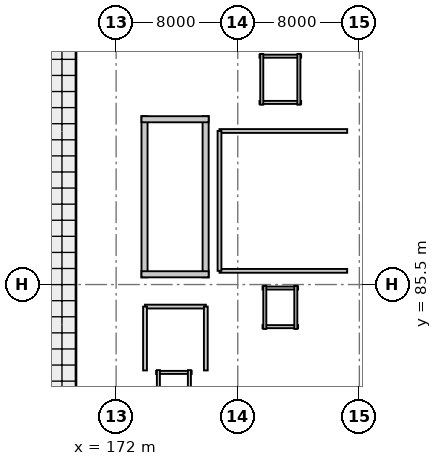
"""IFC4 building model, lengths in metres.
Left out: names, types, materials, properties, quantities, classifications, styles, units other than length and angle.
Written with IfcOpenShell. Run it as: python <this file> out.ifc"""

import sys

from ifc_helpers import new_model, si_unit, direction, frame, frame_2d, origin, origin_2d, place, context, subcontext, project, spatial, rectangle, extrude, element, fill, save


model = new_model("IFC4")
c1 = context("Model", 3, precision=1e-05, world=origin(), true_north=direction((0.0, 1.0)))
c2 = subcontext(c1, "Body", "Model", "MODEL_VIEW")
j1 = project(units=[si_unit("LENGTHUNIT", "METRE"), si_unit("PLANEANGLEUNIT", "RADIAN")], contexts=[c1])
p1 = place(None, origin())
s1 = spatial("IfcSite", under=j1, at=p1, CompositionType="ELEMENT")
p2 = place(p1, origin())
s2 = spatial("IfcBuilding", under=s1, at=p2, CompositionType="ELEMENT")
p3 = place(p2, frame((0.0, 0.0, 6.6)))
s3 = spatial("IfcBuildingStorey", under=s2, at=p3, CompositionType="ELEMENT", Elevation=6.6)
for number, where, z_axis, x_axis in (
    (1, (172.0, 85.5, 0.0), (0.0, 0.0, 1.0), (1.0, 0.0, 0.0)),
    (2, (172.0, 94.5, 0.0), (0.0, 0.0, 1.0), (1.0, 0.0, 0.0)),
    (3, (180.0, 85.5, 0.0), (0.0, 0.0, 1.0), (1.0, 0.0, 0.0)),
    (4, (180.0, 94.5, 0.0), (0.0, 0.0, 1.0), (1.0, 0.0, 0.0)),
    (5, (188.0, 85.5, 0.0), (0.0, 0.0, 1.0), (1.0, 0.0, 0.0)),
    (6, (188.0, 94.5, 0.0), (0.0, 0.0, 1.0), (1.0, 0.0, 0.0)),
):
    element("IfcColumn", number, at=place(p3, frame(where, z_axis=z_axis, x_axis=x_axis)), inside=s3, PredefinedType="COLUMN", context=c2, shape_type="SweptSolid", body=[
        extrude(rectangle(XDim=0.8, YDim=0.8, at=origin_2d()), origin(), (0.0, 0.0, 1.0), 4.2),
    ])
for number, where, z_axis, x_axis in (
    (7, (177.887, 85.975, 0.0), (0.0, 0.0, 1.0), (0.0, 1.0, 0.0)),
    (8, (173.867, 96.573, 0.0), (0.0, 0.0, 1.0), (0.0, -1.0, 0.0)),
):
    element("IfcWall", number, at=place(p3, frame(where, z_axis=z_axis, x_axis=x_axis)), inside=s3, PredefinedType="SHEAR", context=c2, shape_type="SweptSolid", body=[
        extrude(rectangle(XDim=10.597, YDim=0.4, at=frame_2d((5.299, 0.0))), origin(), (0.0, 0.0, 1.0), 3.98),
    ])
p4 = place(p3, frame((178.087, 96.373, 0.0), z_axis=(0.0, 0.0, 1.0), x_axis=(-1.0, 0.0, 0.0)))
e9 = element("IfcWall", 9, at=p4, inside=s3, PredefinedType="SHEAR", context=c2, shape_type="SweptSolid", body=[
    extrude(rectangle(XDim=4.42, YDim=0.4, at=frame_2d((2.21, 0.0))), origin(), (0.0, 0.0, 1.0), 3.98),
])
p5 = place(p3, frame((173.667, 86.175, 0.0), z_axis=(0.0, 0.0, 1.0), x_axis=(1.0, 0.0, 0.0)))
e10 = element("IfcWall", 10, at=p5, inside=s3, PredefinedType="SHEAR", context=c2, shape_type="SweptSolid", body=[
    extrude(rectangle(XDim=4.42, YDim=0.4, at=frame_2d((2.21, 0.0))), origin(), (0.0, 0.0, 1.0), 3.98),
])
p6 = place(p5, frame((1.15, 0.0, 0.0)))
e11 = element("IfcOpeningElement", 11, at=p6, cuts=e10, PredefinedType="OPENING", context=c2, shape_type="SweptSolid", body=[
    extrude(rectangle(XDim=1.3, YDim=2.1, at=frame_2d((0.65, 1.05))), frame((0.0, 0.21, 0.0), z_axis=(0.0, -1.0, 0.0), x_axis=(1.0, 0.0, 0.0)), (0.0, 0.0, 1.0), 0.42),
])
p7 = place(p3, frame((176.97, 79.72, 0.0), z_axis=(0.0, 0.0, 1.0), x_axis=(-1.0, 0.0, 0.0)))
e12 = element("IfcWall", 12, at=p7, inside=s3, PredefinedType="SOLIDWALL", context=c2, shape_type="SweptSolid", body=[
    extrude(rectangle(XDim=2.34, YDim=0.2, at=frame_2d((1.17, 0.0))), origin(), (0.0, 0.0, 1.0), 3.955),
])
p8 = place(p7, frame((0.57, 0.0, 0.0)))
e13 = element("IfcOpeningElement", 13, at=p8, cuts=e12, PredefinedType="OPENING", context=c2, shape_type="SweptSolid", body=[
    extrude(rectangle(XDim=1.2, YDim=2.15, at=frame_2d((0.6, 1.075))), frame((0.0, 0.11, 0.0), z_axis=(0.0, -1.0, 0.0), x_axis=(1.0, 0.0, 0.0)), (0.0, 0.0, 1.0), 0.22),
])
for number, where, z_axis, x_axis in (
    (14, (174.78, 79.87, 0.0), (0.0, 0.0, 1.0), (0.0, -1.0, 0.0)),
    (15, (176.82, 76.73, 0.0), (0.0, 0.0, 1.0), (0.0, 1.0, 0.0)),
):
    element("IfcWall", number, at=place(p3, frame(where, z_axis=z_axis, x_axis=x_axis)), inside=s3, PredefinedType="SOLIDWALL", context=c2, shape_type="SweptSolid", body=[
        extrude(rectangle(XDim=3.14, YDim=0.2, at=frame_2d((1.57, 0.0))), origin(), (0.0, 0.0, 1.0), 3.515),
    ])
p9 = place(p3, frame((181.63, 82.73, 0.0), z_axis=(0.0, 0.0, 1.0), x_axis=(1.0, 0.0, 0.0)))
e16 = element("IfcWall", 16, at=p9, inside=s3, PredefinedType="SOLIDWALL", context=c2, shape_type="SweptSolid", body=[
    extrude(rectangle(XDim=2.34, YDim=0.2, at=frame_2d((1.17, 0.0))), origin(), (0.0, 0.0, 1.0), 3.955),
])
p10 = place(p3, frame((183.97, 85.27, 0.0), z_axis=(0.0, 0.0, 1.0), x_axis=(-1.0, 0.0, 0.0)))
e17 = element("IfcWall", 17, at=p10, inside=s3, PredefinedType="SOLIDWALL", context=c2, shape_type="SweptSolid", body=[
    extrude(rectangle(XDim=2.34, YDim=0.2, at=frame_2d((1.17, 0.0))), origin(), (0.0, 0.0, 1.0), 3.515),
])
p11 = place(p10, frame((0.62, 0.0, 0.0)))
e18 = element("IfcOpeningElement", 18, at=p11, cuts=e17, PredefinedType="OPENING", context=c2, shape_type="SweptSolid", body=[
    extrude(rectangle(XDim=1.1, YDim=2.15, at=frame_2d((0.55, 1.075))), frame((0.0, 0.11, 0.0), z_axis=(0.0, -1.0, 0.0), x_axis=(1.0, 0.0, 0.0)), (0.0, 0.0, 1.0), 0.22),
])
for number, where, z_axis, x_axis in (
    (19, (181.78, 85.42, 0.0), (0.0, 0.0, 1.0), (0.0, -1.0, 0.0)),
    (20, (183.82, 82.58, 0.0), (0.0, 0.0, 1.0), (0.0, 1.0, 0.0)),
):
    element("IfcWall", number, at=place(p3, frame(where, z_axis=z_axis, x_axis=x_axis)), inside=s3, PredefinedType="SOLIDWALL", context=c2, shape_type="SweptSolid", body=[
        extrude(rectangle(XDim=2.84, YDim=0.2, at=frame_2d((1.42, 0.0))), origin(), (0.0, 0.0, 1.0), 3.515),
    ])
for number, where, z_axis, x_axis in (
    (21, (181.43, 97.48, 0.0), (0.0, 0.0, 1.0), (1.0, 0.0, 0.0)),
    (22, (184.17, 100.52, 0.0), (0.0, 0.0, 1.0), (-1.0, 0.0, 0.0)),
):
    element("IfcWall", number, at=place(p3, frame(where, z_axis=z_axis, x_axis=x_axis)), inside=s3, PredefinedType="SOLIDWALL", context=c2, shape_type="SweptSolid", body=[
        extrude(rectangle(XDim=2.74, YDim=0.2, at=frame_2d((1.37, 0.0))), origin(), (0.0, 0.0, 1.0), 3.955),
    ])
p12 = place(p3, frame((181.58, 100.67, 0.0), z_axis=(0.0, 0.0, 1.0), x_axis=(0.0, -1.0, 0.0)))
e23 = element("IfcWall", 23, at=p12, inside=s3, PredefinedType="SOLIDWALL", context=c2, shape_type="SweptSolid", body=[
    extrude(rectangle(XDim=3.34, YDim=0.2, at=frame_2d((1.67, 0.0))), origin(), (0.0, 0.0, 1.0), 3.955),
])
p13 = place(p12, frame((0.92, 0.0, 0.0)))
e24 = element("IfcOpeningElement", 24, at=p13, cuts=e23, PredefinedType="OPENING", context=c2, shape_type="SweptSolid", body=[
    extrude(rectangle(XDim=1.5, YDim=2.2, at=frame_2d((0.75, 1.1))), frame((0.0, 0.11, 0.0), z_axis=(0.0, -1.0, 0.0), x_axis=(1.0, 0.0, 0.0)), (0.0, 0.0, 1.0), 0.22),
])
p14 = place(p3, frame((184.02, 97.33, 0.0), z_axis=(0.0, 0.0, 1.0), x_axis=(0.0, 1.0, 0.0)))
e25 = element("IfcWall", 25, at=p14, inside=s3, PredefinedType="SOLIDWALL", context=c2, shape_type="SweptSolid", body=[
    extrude(rectangle(XDim=3.34, YDim=0.2, at=frame_2d((1.67, 0.0))), origin(), (0.0, 0.0, 1.0), 3.955),
])
p15 = place(p3, frame((187.2, 86.4, 0.0), z_axis=(0.0, 0.0, 1.0), x_axis=(-1.0, 0.0, 0.0)))
e26 = element("IfcWall", 26, at=p15, inside=s3, PredefinedType="SOLIDWALL", context=c2, shape_type="SweptSolid", body=[
    extrude(rectangle(XDim=8.4, YDim=0.25, at=frame_2d((4.2, 0.0))), origin(), (0.0, 0.0, 1.0), 3.495),
])
p16 = place(p3, frame((178.8, 95.6, 0.0), z_axis=(0.0, 0.0, 1.0), x_axis=(1.0, 0.0, 0.0)))
e27 = element("IfcWall", 27, at=p16, inside=s3, PredefinedType="SOLIDWALL", context=c2, shape_type="SweptSolid", body=[
    extrude(rectangle(XDim=8.4, YDim=0.25, at=frame_2d((4.2, 0.0))), origin(), (0.0, 0.0, 1.0), 3.495),
])
p17 = place(p16, frame((3.6, 0.0, 0.0)))
e28 = element("IfcOpeningElement", 28, at=p17, cuts=e27, PredefinedType="OPENING", context=c2, shape_type="SweptSolid", body=[
    extrude(rectangle(XDim=1.2, YDim=2.1, at=frame_2d((0.6, 1.05))), frame((0.0, 0.135, 0.0), z_axis=(0.0, -1.0, 0.0), x_axis=(1.0, 0.0, 0.0)), (0.0, 0.0, 1.0), 0.27),
])
p18 = place(p3, frame((178.8, 86.4, 0.0), z_axis=(0.0, 0.0, 1.0), x_axis=(0.0, 1.0, 0.0)))
e29 = element("IfcWall", 29, at=p18, inside=s3, PredefinedType="SOLIDWALL", context=c2, shape_type="SweptSolid", body=[
    extrude(rectangle(XDim=9.2, YDim=0.25, at=frame_2d((4.6, 0.0))), origin(), (0.0, 0.0, 1.0), 3.515),
])
p19 = place(p3, frame((173.9, 84.05, 0.0), z_axis=(0.0, 0.0, 1.0), x_axis=(1.0, 0.0, 0.0)))
e30 = element("IfcWall", 30, at=p19, inside=s3, PredefinedType="SOLIDWALL", context=c2, shape_type="SweptSolid", body=[
    extrude(rectangle(XDim=4.0, YDim=0.25, at=frame_2d((2.0, 0.0))), origin(), (0.0, 0.0, 1.0), 3.955),
])
p20 = place(p3, frame((173.9, 79.85, 0.0), z_axis=(0.0, 0.0, 1.0), x_axis=(0.0, 1.0, 0.0)))
e31 = element("IfcWall", 31, at=p20, inside=s3, PredefinedType="SOLIDWALL", context=c2, shape_type="SweptSolid", body=[
    extrude(rectangle(XDim=4.2, YDim=0.25, at=frame_2d((2.1, 0.0))), origin(), (0.0, 0.0, 1.0), 3.955),
])
p21 = place(p20, frame((1.4, 0.0, 0.0)))
e32 = element("IfcOpeningElement", 32, at=p21, cuts=e31, PredefinedType="OPENING", context=c2, shape_type="SweptSolid", body=[
    extrude(rectangle(XDim=1.4, YDim=2.1, at=frame_2d((0.7, 1.05))), frame((0.0, 0.135, 0.0), z_axis=(0.0, -1.0, 0.0), x_axis=(1.0, 0.0, 0.0)), (0.0, 0.0, 1.0), 0.27),
])
p22 = place(p3, frame((177.9, 84.05, 0.0), z_axis=(0.0, 0.0, 1.0), x_axis=(0.0, -1.0, 0.0)))
e33 = element("IfcWall", 33, at=p22, inside=s3, PredefinedType="SOLIDWALL", context=c2, shape_type="SweptSolid", body=[
    extrude(rectangle(XDim=4.2, YDim=0.25, at=frame_2d((2.1, 0.0))), origin(), (0.0, 0.0, 1.0), 3.955),
])
p23 = place(p6, origin())
e34 = element("IfcDoor", 34, at=p23, inside=s3, OperationType="SINGLE_SWING_LEFT", PredefinedType="DOOR", context=c2, shape_type="SweptSolid", body=[
    extrude(rectangle(XDim=1.3, YDim=2.1, at=frame_2d((0.65, 1.05))), frame((0.0, 0.025, 0.0), z_axis=(0.0, -1.0, 0.0), x_axis=(1.0, 0.0, 0.0)), (0.0, 0.0, 1.0), 0.05),
])
fill(e11, e34)
p24 = place(p8, origin())
e35 = element("IfcDoor", 35, at=p24, inside=s3, OperationType="SLIDING_TO_LEFT", PredefinedType="DOOR", context=c2, shape_type="SweptSolid", body=[
    extrude(rectangle(XDim=1.2, YDim=2.15, at=frame_2d((0.6, 1.075))), frame((0.0, 0.025, 0.0), z_axis=(0.0, -1.0, 0.0), x_axis=(1.0, 0.0, 0.0)), (0.0, 0.0, 1.0), 0.05),
])
fill(e13, e35)
p25 = place(p11, origin())
e36 = element("IfcDoor", 36, at=p25, inside=s3, OperationType="SLIDING_TO_LEFT", PredefinedType="DOOR", context=c2, shape_type="SweptSolid", body=[
    extrude(rectangle(XDim=1.1, YDim=2.15, at=frame_2d((0.55, 1.075))), frame((0.0, 0.025, 0.0), z_axis=(0.0, -1.0, 0.0), x_axis=(1.0, 0.0, 0.0)), (0.0, 0.0, 1.0), 0.05),
])
fill(e18, e36)
p26 = place(p13, origin())
e37 = element("IfcDoor", 37, at=p26, inside=s3, OperationType="SLIDING_TO_LEFT", PredefinedType="DOOR", context=c2, shape_type="SweptSolid", body=[
    extrude(rectangle(XDim=1.5, YDim=2.2, at=frame_2d((0.75, 1.1))), frame((0.0, 0.025, 0.0), z_axis=(0.0, -1.0, 0.0), x_axis=(1.0, 0.0, 0.0)), (0.0, 0.0, 1.0), 0.05),
])
fill(e24, e37)
p27 = place(p17, origin())
e38 = element("IfcDoor", 38, at=p27, inside=s3, OperationType="SINGLE_SWING_RIGHT", PredefinedType="DOOR", context=c2, shape_type="SweptSolid", body=[
    extrude(rectangle(XDim=1.2, YDim=2.1, at=frame_2d((0.6, 1.05))), frame((0.0, 0.025, 0.0), z_axis=(0.0, -1.0, 0.0), x_axis=(1.0, 0.0, 0.0)), (0.0, 0.0, 1.0), 0.05),
])
fill(e28, e38)
p28 = place(p21, origin())
e39 = element("IfcDoor", 39, at=p28, inside=s3, OperationType="SINGLE_SWING_RIGHT", PredefinedType="DOOR", context=c2, shape_type="SweptSolid", body=[
    extrude(rectangle(XDim=1.4, YDim=2.1, at=frame_2d((0.7, 1.05))), frame((0.0, 0.025, 0.0), z_axis=(0.0, -1.0, 0.0), x_axis=(1.0, 0.0, 0.0)), (0.0, 0.0, 1.0), 0.05),
])
fill(e32, e39)
save(model, sys.argv[1])
